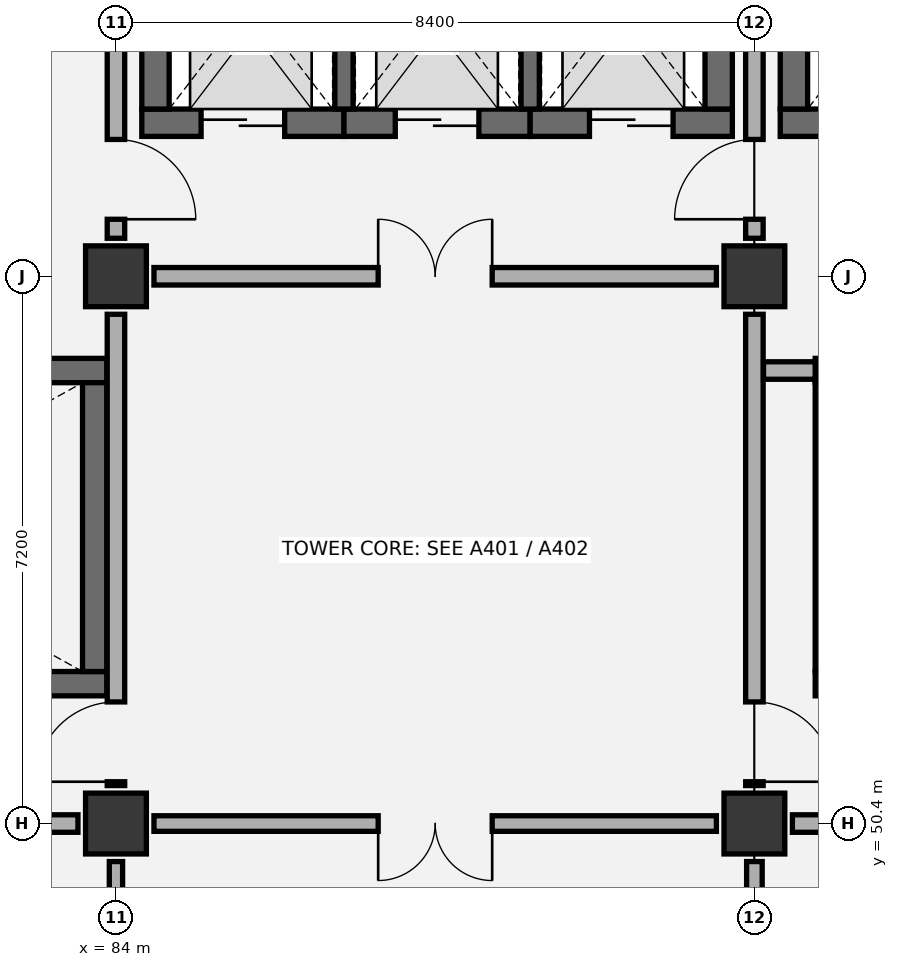
"""IFC4 building model, lengths in metres.
Left out: names, types, materials, properties, quantities, classifications, styles, units other than length and angle.
Written with IfcOpenShell. Run it as: python <this file> out.ifc"""

import sys

from ifc_helpers import new_model, si_unit, direction, frame, frame_2d, origin, origin_2d, place, context, subcontext, project, spatial, rectangle, extrude, element, fill, save


model = new_model("IFC4")
c1 = context("Model", 3, precision=1e-05, world=origin(), true_north=direction((0.0, 1.0)))
c2 = subcontext(c1, "Body", "Model", "MODEL_VIEW")
j1 = project(units=[si_unit("LENGTHUNIT", "METRE"), si_unit("PLANEANGLEUNIT", "RADIAN")], contexts=[c1])
p1 = place(None, origin())
s1 = spatial("IfcSite", under=j1, at=p1, CompositionType="ELEMENT")
p2 = place(p1, origin())
s2 = spatial("IfcBuilding", under=s1, at=p2, CompositionType="ELEMENT")
p3 = place(p2, frame((0.0, 0.0, 16.8)))
s3 = spatial("IfcBuildingStorey", under=s2, at=p3, CompositionType="ELEMENT", Elevation=16.8)
for number, where, z_axis, x_axis in (
    (1, (84.0, 50.4, 0.0), (0.0, 0.0, 1.0), (1.0, 0.0, 0.0)),
    (2, (84.0, 57.6, 0.0), (0.0, 0.0, 1.0), (1.0, 0.0, 0.0)),
    (3, (92.4, 50.4, 0.0), (0.0, 0.0, 1.0), (1.0, 0.0, 0.0)),
    (4, (92.4, 57.6, 0.0), (0.0, 0.0, 1.0), (1.0, 0.0, 0.0)),
):
    element("IfcColumn", number, at=place(p3, frame(where, z_axis=z_axis, x_axis=x_axis)), inside=s3, PredefinedType="COLUMN", context=c2, shape_type="SweptSolid", body=[
        extrude(rectangle(XDim=0.8, YDim=0.8, at=origin_2d()), origin(), (0.0, 0.0, 1.0), 5.4),
    ])
p4 = place(p3, frame((76.4, 52.24, 0.0), z_axis=(0.0, 0.0, 1.0), x_axis=(1.0, 0.0, 0.0)))
e5 = element("IfcWall", 5, at=p4, inside=s3, PredefinedType="SHEAR", context=c2, shape_type="SweptSolid", body=[
    extrude(rectangle(XDim=7.48, YDim=0.32, at=frame_2d((3.74, 0.0))), origin(), (0.0, 0.0, 1.0), 4.95),
])
p5 = place(p4, frame((0.45, 0.0, 0.0)))
e6 = element("IfcOpeningElement", 6, at=p5, cuts=e5, PredefinedType="OPENING", context=c2, shape_type="SweptSolid", body=[
    extrude(rectangle(XDim=1.05, YDim=2.15, at=frame_2d((0.525, 1.075))), frame((0.0, 0.17, 0.0), z_axis=(0.0, -1.0, 0.0), x_axis=(1.0, 0.0, 0.0)), (0.0, 0.0, 1.0), 0.34),
])
p6 = place(p3, frame((76.4, 56.36, 0.0), z_axis=(0.0, 0.0, 1.0), x_axis=(1.0, 0.0, 0.0)))
e7 = element("IfcWall", 7, at=p6, inside=s3, PredefinedType="SHEAR", context=c2, shape_type="SweptSolid", body=[
    extrude(rectangle(XDim=7.48, YDim=0.32, at=frame_2d((3.74, 0.0))), origin(), (0.0, 0.0, 1.0), 4.95),
])
p7 = place(p3, frame((83.72, 52.4, 0.0), z_axis=(0.0, 0.0, 1.0), x_axis=(0.0, 1.0, 0.0)))
e8 = element("IfcWall", 8, at=p7, inside=s3, PredefinedType="SHEAR", context=c2, shape_type="SweptSolid", body=[
    extrude(rectangle(XDim=3.8, YDim=0.32, at=frame_2d((1.9, 0.0))), origin(), (0.0, 0.0, 1.0), 4.95),
])
p8 = place(p3, frame((93.2, 52.24, 0.0), z_axis=(0.0, 0.0, 1.0), x_axis=(1.0, 0.0, 0.0)))
e9 = element("IfcWall", 9, at=p8, inside=s3, PredefinedType="SHEAR", context=c2, shape_type="SweptSolid", body=[
    extrude(rectangle(XDim=7.48, YDim=0.32, at=frame_2d((3.74, 0.0))), origin(), (0.0, 0.0, 1.0), 4.95),
])
p9 = place(p8, frame((0.45, 0.0, 0.0)))
e10 = element("IfcOpeningElement", 10, at=p9, cuts=e9, PredefinedType="OPENING", context=c2, shape_type="SweptSolid", body=[
    extrude(rectangle(XDim=1.05, YDim=2.15, at=frame_2d((0.525, 1.075))), frame((0.0, 0.17, 0.0), z_axis=(0.0, -1.0, 0.0), x_axis=(1.0, 0.0, 0.0)), (0.0, 0.0, 1.0), 0.34),
])
p10 = place(p3, frame((93.2, 56.36, 0.0), z_axis=(0.0, 0.0, 1.0), x_axis=(1.0, 0.0, 0.0)))
e11 = element("IfcWall", 11, at=p10, inside=s3, PredefinedType="SHEAR", context=c2, shape_type="SweptSolid", body=[
    extrude(rectangle(XDim=7.48, YDim=0.32, at=frame_2d((3.74, 0.0))), origin(), (0.0, 0.0, 1.0), 4.95),
])
p11 = place(p3, frame((93.36, 52.4, 0.0), z_axis=(0.0, 0.0, 1.0), x_axis=(0.0, 1.0, 0.0)))
e12 = element("IfcWall", 12, at=p11, inside=s3, PredefinedType="SHEAR", context=c2, shape_type="SweptSolid", body=[
    extrude(rectangle(XDim=3.8, YDim=0.32, at=frame_2d((1.9, 0.0))), origin(), (0.0, 0.0, 1.0), 4.95),
])
p12 = place(p3, frame((84.34, 59.62, 0.0), z_axis=(0.0, 0.0, 1.0), x_axis=(1.0, 0.0, 0.0)))
e13 = element("IfcWall", 13, at=p12, inside=s3, PredefinedType="SHEAR", context=c2, shape_type="SweptSolid", body=[
    extrude(rectangle(XDim=2.66, YDim=0.36, at=frame_2d((1.33, 0.0))), origin(), (0.0, 0.0, 1.0), 4.95),
])
p13 = place(p12, frame((0.78, 0.0, 0.0)))
e14 = element("IfcOpeningElement", 14, at=p13, cuts=e13, PredefinedType="OPENING", context=c2, shape_type="SweptSolid", body=[
    extrude(rectangle(XDim=1.1, YDim=2.15, at=frame_2d((0.55, 1.075))), frame((0.0, 0.19, 0.0), z_axis=(0.0, -1.0, 0.0), x_axis=(1.0, 0.0, 0.0)), (0.0, 0.0, 1.0), 0.38),
])
p14 = place(p3, frame((87.0, 59.62, 0.0), z_axis=(0.0, 0.0, 1.0), x_axis=(1.0, 0.0, 0.0)))
e15 = element("IfcWall", 15, at=p14, inside=s3, PredefinedType="SHEAR", context=c2, shape_type="SweptSolid", body=[
    extrude(rectangle(XDim=2.45, YDim=0.36, at=frame_2d((1.225, 0.0))), origin(), (0.0, 0.0, 1.0), 4.95),
])
p15 = place(p14, frame((0.675, 0.0, 0.0)))
e16 = element("IfcOpeningElement", 16, at=p15, cuts=e15, PredefinedType="OPENING", context=c2, shape_type="SweptSolid", body=[
    extrude(rectangle(XDim=1.1, YDim=2.15, at=frame_2d((0.55, 1.075))), frame((0.0, 0.19, 0.0), z_axis=(0.0, -1.0, 0.0), x_axis=(1.0, 0.0, 0.0)), (0.0, 0.0, 1.0), 0.38),
])
p16 = place(p3, frame((89.45, 59.62, 0.0), z_axis=(0.0, 0.0, 1.0), x_axis=(1.0, 0.0, 0.0)))
e17 = element("IfcWall", 17, at=p16, inside=s3, PredefinedType="SHEAR", context=c2, shape_type="SweptSolid", body=[
    extrude(rectangle(XDim=2.66, YDim=0.36, at=frame_2d((1.33, 0.0))), origin(), (0.0, 0.0, 1.0), 4.95),
])
p17 = place(p16, frame((0.78, 0.0, 0.0)))
e18 = element("IfcOpeningElement", 18, at=p17, cuts=e17, PredefinedType="OPENING", context=c2, shape_type="SweptSolid", body=[
    extrude(rectangle(XDim=1.1, YDim=2.15, at=frame_2d((0.55, 1.075))), frame((0.0, 0.19, 0.0), z_axis=(0.0, -1.0, 0.0), x_axis=(1.0, 0.0, 0.0)), (0.0, 0.0, 1.0), 0.38),
])
for number, where, z_axis, x_axis in (
    (19, (84.52, 59.8, 0.0), (0.0, 0.0, 1.0), (0.0, 1.0, 0.0)),
    (20, (91.93, 59.8, 0.0), (0.0, 0.0, 1.0), (0.0, 1.0, 0.0)),
):
    element("IfcWall", number, at=place(p3, frame(where, z_axis=z_axis, x_axis=x_axis)), inside=s3, PredefinedType="SHEAR", context=c2, shape_type="SweptSolid", body=[
        extrude(rectangle(XDim=2.8, YDim=0.36, at=frame_2d((1.4, 0.0))), origin(), (0.0, 0.0, 1.0), 4.95),
    ])
for number, where, z_axis, x_axis in (
    (21, (87.0, 59.8, 0.0), (0.0, 0.0, 1.0), (0.0, 1.0, 0.0)),
    (22, (89.45, 59.8, 0.0), (0.0, 0.0, 1.0), (0.0, 1.0, 0.0)),
):
    element("IfcWall", number, at=place(p3, frame(where, z_axis=z_axis, x_axis=x_axis)), inside=s3, PredefinedType="SHEAR", context=c2, shape_type="SweptSolid", body=[
        extrude(rectangle(XDim=2.8, YDim=0.24, at=frame_2d((1.4, 0.0))), origin(), (0.0, 0.0, 1.0), 4.95),
    ])
p18 = place(p3, frame((92.74, 59.62, 0.0), z_axis=(0.0, 0.0, 1.0), x_axis=(1.0, 0.0, 0.0)))
e23 = element("IfcWall", 23, at=p18, inside=s3, PredefinedType="SHEAR", context=c2, shape_type="SweptSolid", body=[
    extrude(rectangle(XDim=2.87, YDim=0.36, at=frame_2d((1.435, 0.0))), origin(), (0.0, 0.0, 1.0), 4.95),
])
p19 = place(p18, frame((0.76, 0.0, 0.0)))
e24 = element("IfcOpeningElement", 24, at=p19, cuts=e23, PredefinedType="OPENING", context=c2, shape_type="SweptSolid", body=[
    extrude(rectangle(XDim=1.35, YDim=2.2, at=frame_2d((0.675, 1.1))), frame((0.0, 0.19, 0.0), z_axis=(0.0, -1.0, 0.0), x_axis=(1.0, 0.0, 0.0)), (0.0, 0.0, 1.0), 0.38),
])
p20 = place(p3, frame((92.92, 59.8, 0.0), z_axis=(0.0, 0.0, 1.0), x_axis=(0.0, 1.0, 0.0)))
e25 = element("IfcWall", 25, at=p20, inside=s3, PredefinedType="SHEAR", context=c2, shape_type="SweptSolid", body=[
    extrude(rectangle(XDim=2.8, YDim=0.36, at=frame_2d((1.4, 0.0))), origin(), (0.0, 0.0, 1.0), 4.95),
])
p21 = place(p3, frame((84.0, 43.7, 0.0), z_axis=(0.0, 0.0, 1.0), x_axis=(0.0, 1.0, 0.0)))
e26 = element("IfcWall", 26, at=p21, inside=s3, PredefinedType="PARTITIONING", context=c2, shape_type="SweptSolid", body=[
    extrude(rectangle(XDim=6.2, YDim=0.175, at=frame_2d((3.1, 0.0))), origin(), (0.0, 0.0, 1.0), 4.245),
])
p22 = place(p21, frame((2.475, 0.0, 0.0)))
e27 = element("IfcOpeningElement", 27, at=p22, cuts=e26, PredefinedType="OPENING", context=c2, shape_type="SweptSolid", body=[
    extrude(rectangle(XDim=1.25, YDim=2.1, at=frame_2d((0.625, 1.05))), frame((0.0, 0.097, 0.0), z_axis=(0.0, -1.0, 0.0), x_axis=(1.0, 0.0, 0.0)), (0.0, 0.0, 1.0), 0.195),
])
p23 = place(p3, frame((76.1, 50.4, 0.0), z_axis=(0.0, 0.0, 1.0), x_axis=(1.0, 0.0, 0.0)))
e28 = element("IfcWall", 28, at=p23, inside=s3, PredefinedType="PARTITIONING", context=c2, shape_type="SweptSolid", body=[
    extrude(rectangle(XDim=7.4, YDim=0.23, at=frame_2d((3.7, 0.0))), origin(), (0.0, 0.0, 1.0), 4.195),
])
p24 = place(p23, frame((2.95, 0.0, 0.0)))
e29 = element("IfcOpeningElement", 29, at=p24, cuts=e28, PredefinedType="OPENING", context=c2, shape_type="SweptSolid", body=[
    extrude(rectangle(XDim=1.5, YDim=2.15, at=frame_2d((0.75, 1.075))), frame((0.0, 0.125, 0.0), z_axis=(0.0, -1.0, 0.0), x_axis=(1.0, 0.0, 0.0)), (0.0, 0.0, 1.0), 0.25),
])
p25 = place(p3, frame((84.0, 50.9, 0.0), z_axis=(0.0, 0.0, 1.0), x_axis=(0.0, 1.0, 0.0)))
e30 = element("IfcWall", 30, at=p25, inside=s3, PredefinedType="PARTITIONING", context=c2, shape_type="SweptSolid", body=[
    extrude(rectangle(XDim=6.2, YDim=0.23, at=frame_2d((3.1, 0.0))), origin(), (0.0, 0.0, 1.0), 4.655),
])
p26 = place(p25, frame((0.05, 0.0, 0.0)))
e31 = element("IfcOpeningElement", 31, at=p26, cuts=e30, PredefinedType="OPENING", context=c2, shape_type="SweptSolid", body=[
    extrude(rectangle(XDim=1.05, YDim=2.15, at=frame_2d((0.525, 1.075))), frame((0.0, 0.125, 0.0), z_axis=(0.0, -1.0, 0.0), x_axis=(1.0, 0.0, 0.0)), (0.0, 0.0, 1.0), 0.25),
])
p27 = place(p3, frame((84.0, 58.1, 0.0), z_axis=(0.0, 0.0, 1.0), x_axis=(0.0, 1.0, 0.0)))
e32 = element("IfcWall", 32, at=p27, inside=s3, PredefinedType="PARTITIONING", context=c2, shape_type="SweptSolid", body=[
    extrude(rectangle(XDim=6.2, YDim=0.23, at=frame_2d((3.1, 0.0))), origin(), (0.0, 0.0, 1.0), 4.245),
])
p28 = place(p27, frame((0.25, 0.0, 0.0)))
e33 = element("IfcOpeningElement", 33, at=p28, cuts=e32, PredefinedType="OPENING", context=c2, shape_type="SweptSolid", body=[
    extrude(rectangle(XDim=1.05, YDim=2.15, at=frame_2d((0.525, 1.075))), frame((0.0, 0.125, 0.0), z_axis=(0.0, -1.0, 0.0), x_axis=(1.0, 0.0, 0.0)), (0.0, 0.0, 1.0), 0.25),
])
p29 = place(p3, frame((92.4, 43.7, 0.0), z_axis=(0.0, 0.0, 1.0), x_axis=(0.0, 1.0, 0.0)))
e34 = element("IfcWall", 34, at=p29, inside=s3, PredefinedType="PARTITIONING", context=c2, shape_type="SweptSolid", body=[
    extrude(rectangle(XDim=6.2, YDim=0.205, at=frame_2d((3.1, 0.0))), origin(), (0.0, 0.0, 1.0), 4.655),
])
p30 = place(p29, frame((2.475, 0.0, 0.0)))
e35 = element("IfcOpeningElement", 35, at=p30, cuts=e34, PredefinedType="OPENING", context=c2, shape_type="SweptSolid", body=[
    extrude(rectangle(XDim=1.25, YDim=2.1, at=frame_2d((0.625, 1.05))), frame((0.0, 0.113, 0.0), z_axis=(0.0, -1.0, 0.0), x_axis=(1.0, 0.0, 0.0)), (0.0, 0.0, 1.0), 0.225),
])
p31 = place(p3, frame((84.5, 50.4, 0.0), z_axis=(0.0, 0.0, 1.0), x_axis=(1.0, 0.0, 0.0)))
e36 = element("IfcWall", 36, at=p31, inside=s3, PredefinedType="PARTITIONING", context=c2, shape_type="SweptSolid", body=[
    extrude(rectangle(XDim=7.4, YDim=0.205, at=frame_2d((3.7, 0.0))), origin(), (0.0, 0.0, 1.0), 4.195),
])
p32 = place(p31, frame((2.95, 0.0, 0.0)))
e37 = element("IfcOpeningElement", 37, at=p32, cuts=e36, PredefinedType="OPENING", context=c2, shape_type="SweptSolid", body=[
    extrude(rectangle(XDim=1.5, YDim=2.2, at=frame_2d((0.75, 1.1))), frame((0.0, 0.113, 0.0), z_axis=(0.0, -1.0, 0.0), x_axis=(1.0, 0.0, 0.0)), (0.0, 0.0, 1.0), 0.225),
])
p33 = place(p3, frame((92.4, 50.9, 0.0), z_axis=(0.0, 0.0, 1.0), x_axis=(0.0, 1.0, 0.0)))
e38 = element("IfcWall", 38, at=p33, inside=s3, PredefinedType="PARTITIONING", context=c2, shape_type="SweptSolid", body=[
    extrude(rectangle(XDim=6.2, YDim=0.23, at=frame_2d((3.1, 0.0))), origin(), (0.0, 0.0, 1.0), 4.245),
])
p34 = place(p33, frame((0.05, 0.0, 0.0)))
e39 = element("IfcOpeningElement", 39, at=p34, cuts=e38, PredefinedType="OPENING", context=c2, shape_type="SweptSolid", body=[
    extrude(rectangle(XDim=1.05, YDim=2.15, at=frame_2d((0.525, 1.075))), frame((0.0, 0.125, 0.0), z_axis=(0.0, -1.0, 0.0), x_axis=(1.0, 0.0, 0.0)), (0.0, 0.0, 1.0), 0.25),
])
p35 = place(p3, frame((84.5, 57.6, 0.0), z_axis=(0.0, 0.0, 1.0), x_axis=(1.0, 0.0, 0.0)))
e40 = element("IfcWall", 40, at=p35, inside=s3, PredefinedType="PARTITIONING", context=c2, shape_type="SweptSolid", body=[
    extrude(rectangle(XDim=7.4, YDim=0.23, at=frame_2d((3.7, 0.0))), origin(), (0.0, 0.0, 1.0), 4.195),
])
p36 = place(p35, frame((2.95, 0.0, 0.0)))
e41 = element("IfcOpeningElement", 41, at=p36, cuts=e40, PredefinedType="OPENING", context=c2, shape_type="SweptSolid", body=[
    extrude(rectangle(XDim=1.5, YDim=2.15, at=frame_2d((0.75, 1.075))), frame((0.0, 0.125, 0.0), z_axis=(0.0, -1.0, 0.0), x_axis=(1.0, 0.0, 0.0)), (0.0, 0.0, 1.0), 0.25),
])
p37 = place(p3, frame((92.4, 58.1, 0.0), z_axis=(0.0, 0.0, 1.0), x_axis=(0.0, 1.0, 0.0)))
e42 = element("IfcWall", 42, at=p37, inside=s3, PredefinedType="PARTITIONING", context=c2, shape_type="SweptSolid", body=[
    extrude(rectangle(XDim=6.2, YDim=0.23, at=frame_2d((3.1, 0.0))), origin(), (0.0, 0.0, 1.0), 4.445),
])
p38 = place(p37, frame((0.25, 0.0, 0.0)))
e43 = element("IfcOpeningElement", 43, at=p38, cuts=e42, PredefinedType="OPENING", context=c2, shape_type="SweptSolid", body=[
    extrude(rectangle(XDim=1.05, YDim=2.15, at=frame_2d((0.525, 1.075))), frame((0.0, 0.125, 0.0), z_axis=(0.0, -1.0, 0.0), x_axis=(1.0, 0.0, 0.0)), (0.0, 0.0, 1.0), 0.25),
])
p39 = place(p3, frame((92.9, 50.4, 0.0), z_axis=(0.0, 0.0, 1.0), x_axis=(1.0, 0.0, 0.0)))
e44 = element("IfcWall", 44, at=p39, inside=s3, PredefinedType="PARTITIONING", context=c2, shape_type="SweptSolid", body=[
    extrude(rectangle(XDim=7.4, YDim=0.23, at=frame_2d((3.7, 0.0))), origin(), (0.0, 0.0, 1.0), 4.195),
])
p40 = place(p39, frame((2.95, 0.0, 0.0)))
e45 = element("IfcOpeningElement", 45, at=p40, cuts=e44, PredefinedType="OPENING", context=c2, shape_type="SweptSolid", body=[
    extrude(rectangle(XDim=1.5, YDim=2.15, at=frame_2d((0.75, 1.075))), frame((0.0, 0.125, 0.0), z_axis=(0.0, -1.0, 0.0), x_axis=(1.0, 0.0, 0.0)), (0.0, 0.0, 1.0), 0.25),
])
p41 = place(p3, frame((92.52, 56.36, 0.0), z_axis=(0.0, 0.0, 1.0), x_axis=(1.0, 0.0, 0.0)))
e46 = element("IfcWall", 46, at=p41, inside=s3, PredefinedType="PARTITIONING", context=c2, shape_type="SweptSolid", body=[
    extrude(rectangle(XDim=0.68, YDim=0.23, at=frame_2d((0.34, 0.0))), origin(), (0.0, 0.0, 1.0), 4.95),
])
p42 = place(p13, origin())
e47 = element("IfcDoor", 47, at=p42, inside=s3, OperationType="DOUBLE_DOOR_SLIDING", PredefinedType="DOOR", context=c2, shape_type="SweptSolid", body=[
    extrude(rectangle(XDim=1.1, YDim=2.15, at=frame_2d((0.55, 1.075))), frame((0.0, 0.025, 0.0), z_axis=(0.0, -1.0, 0.0), x_axis=(1.0, 0.0, 0.0)), (0.0, 0.0, 1.0), 0.05),
])
fill(e14, e47)
p43 = place(p15, origin())
e48 = element("IfcDoor", 48, at=p43, inside=s3, OperationType="DOUBLE_DOOR_SLIDING", PredefinedType="DOOR", context=c2, shape_type="SweptSolid", body=[
    extrude(rectangle(XDim=1.1, YDim=2.15, at=frame_2d((0.55, 1.075))), frame((0.0, 0.025, 0.0), z_axis=(0.0, -1.0, 0.0), x_axis=(1.0, 0.0, 0.0)), (0.0, 0.0, 1.0), 0.05),
])
fill(e16, e48)
p44 = place(p17, origin())
e49 = element("IfcDoor", 49, at=p44, inside=s3, OperationType="DOUBLE_DOOR_SLIDING", PredefinedType="DOOR", context=c2, shape_type="SweptSolid", body=[
    extrude(rectangle(XDim=1.1, YDim=2.15, at=frame_2d((0.55, 1.075))), frame((0.0, 0.025, 0.0), z_axis=(0.0, -1.0, 0.0), x_axis=(1.0, 0.0, 0.0)), (0.0, 0.0, 1.0), 0.05),
])
fill(e18, e49)
p45 = place(p26, origin())
e50 = element("IfcDoor", 50, at=p45, inside=s3, OperationType="SINGLE_SWING_LEFT", PredefinedType="DOOR", context=c2, shape_type="SweptSolid", body=[
    extrude(rectangle(XDim=1.05, YDim=2.15, at=frame_2d((0.525, 1.075))), frame((0.0, 0.025, 0.0), z_axis=(0.0, -1.0, 0.0), x_axis=(1.0, 0.0, 0.0)), (0.0, 0.0, 1.0), 0.05),
])
fill(e31, e50)
p46 = place(p28, frame((1.05, 0.0, 0.0), z_axis=(0.0, 0.0, 1.0), x_axis=(-1.0, 0.0, 0.0)))
e51 = element("IfcDoor", 51, at=p46, inside=s3, OperationType="SINGLE_SWING_RIGHT", PredefinedType="DOOR", context=c2, shape_type="SweptSolid", body=[
    extrude(rectangle(XDim=1.05, YDim=2.15, at=frame_2d((0.525, 1.075))), frame((0.0, 0.025, 0.0), z_axis=(0.0, -1.0, 0.0), x_axis=(1.0, 0.0, 0.0)), (0.0, 0.0, 1.0), 0.05),
])
fill(e33, e51)
p47 = place(p32, frame((1.5, 0.0, 0.0), z_axis=(0.0, 0.0, 1.0), x_axis=(-1.0, 0.0, 0.0)))
e52 = element("IfcDoor", 52, at=p47, inside=s3, OperationType="DOUBLE_DOOR_SINGLE_SWING", PredefinedType="DOOR", context=c2, shape_type="SweptSolid", body=[
    extrude(rectangle(XDim=1.5, YDim=2.2, at=frame_2d((0.75, 1.1))), frame((0.0, 0.025, 0.0), z_axis=(0.0, -1.0, 0.0), x_axis=(1.0, 0.0, 0.0)), (0.0, 0.0, 1.0), 0.05),
])
fill(e37, e52)
p48 = place(p34, frame((1.05, 0.0, 0.0), z_axis=(0.0, 0.0, 1.0), x_axis=(-1.0, 0.0, 0.0)))
e53 = element("IfcDoor", 53, at=p48, inside=s3, OperationType="SINGLE_SWING_RIGHT", PredefinedType="DOOR", context=c2, shape_type="SweptSolid", body=[
    extrude(rectangle(XDim=1.05, YDim=2.15, at=frame_2d((0.525, 1.075))), frame((0.0, 0.025, 0.0), z_axis=(0.0, -1.0, 0.0), x_axis=(1.0, 0.0, 0.0)), (0.0, 0.0, 1.0), 0.05),
])
fill(e39, e53)
p49 = place(p36, origin())
e54 = element("IfcDoor", 54, at=p49, inside=s3, OperationType="DOUBLE_DOOR_SINGLE_SWING", PredefinedType="DOOR", context=c2, shape_type="SweptSolid", body=[
    extrude(rectangle(XDim=1.5, YDim=2.15, at=frame_2d((0.75, 1.075))), frame((0.0, 0.025, 0.0), z_axis=(0.0, -1.0, 0.0), x_axis=(1.0, 0.0, 0.0)), (0.0, 0.0, 1.0), 0.05),
])
fill(e41, e54)
p50 = place(p38, origin())
e55 = element("IfcDoor", 55, at=p50, inside=s3, OperationType="SINGLE_SWING_LEFT", PredefinedType="DOOR", context=c2, shape_type="SweptSolid", body=[
    extrude(rectangle(XDim=1.05, YDim=2.15, at=frame_2d((0.525, 1.075))), frame((0.0, 0.025, 0.0), z_axis=(0.0, -1.0, 0.0), x_axis=(1.0, 0.0, 0.0)), (0.0, 0.0, 1.0), 0.05),
])
fill(e43, e55)
save(model, sys.argv[1])
